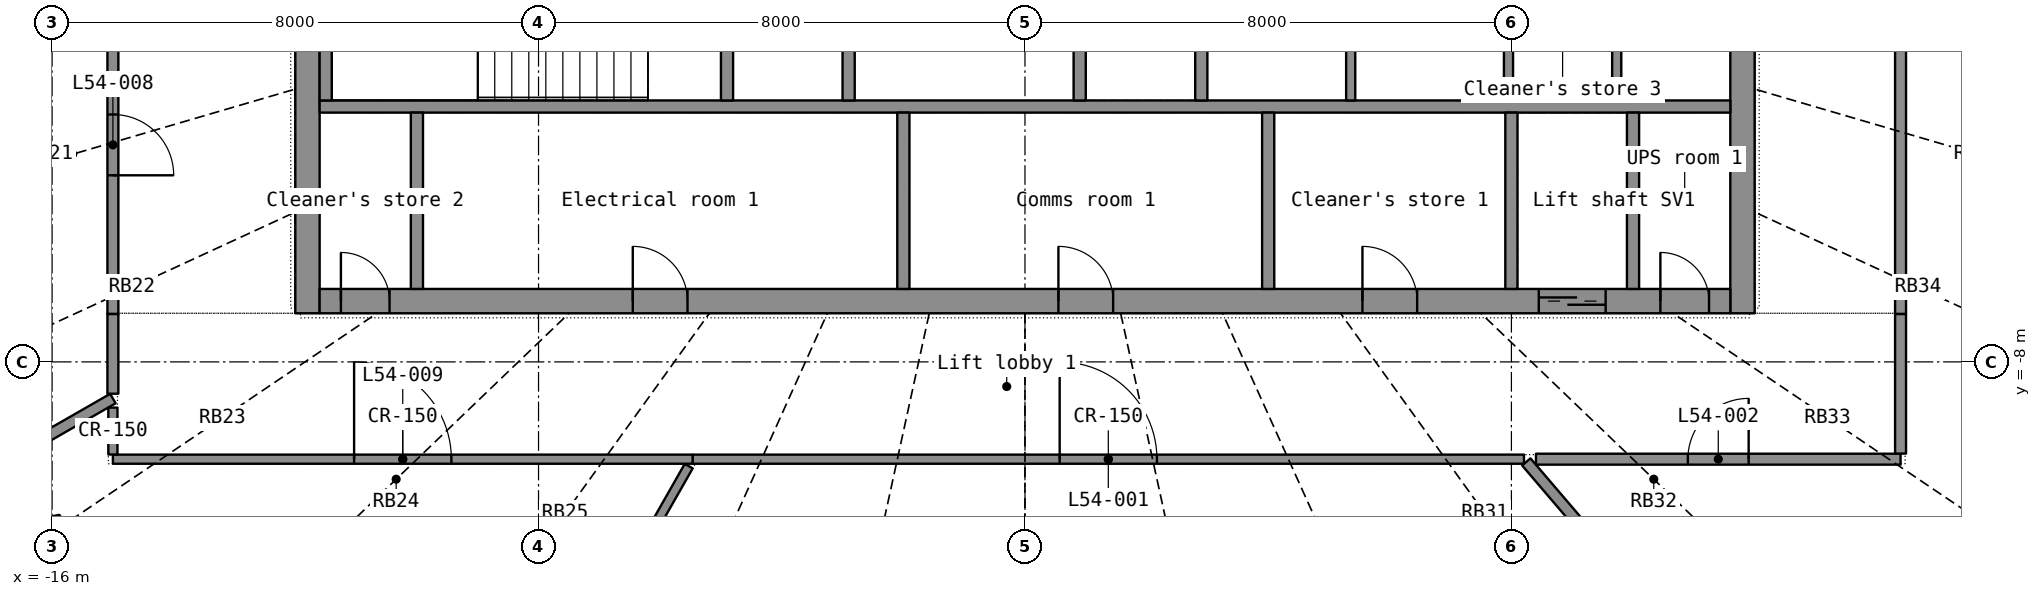
"""IFC4 building model, lengths in metres.
Left out: names, types, materials, properties, quantities, classifications, styles, units other than length and angle.
Written with IfcOpenShell. Run it as: python <this file> out.ifc"""

import sys

from ifc_helpers import new_model, si_unit, direction, frame, frame_2d, origin, origin_2d, place, context, subcontext, project, spatial, rectangle, hollow_rectangle, extrude, element, fill, save


model = new_model("IFC4")
c1 = context("Model", 3, precision=1e-05, world=origin(), true_north=direction((0.0, 1.0)))
c2 = subcontext(c1, "Body", "Model", "MODEL_VIEW")
j1 = project(units=[si_unit("LENGTHUNIT", "METRE"), si_unit("PLANEANGLEUNIT", "RADIAN")], contexts=[c1])
p1 = place(None, origin())
s1 = spatial("IfcSite", under=j1, at=p1, CompositionType="ELEMENT")
p2 = place(p1, origin())
s2 = spatial("IfcBuilding", under=s1, at=p2, CompositionType="ELEMENT")
p3 = place(p2, frame((0.0, 0.0, 224.5)))
s3 = spatial("IfcBuildingStorey", under=s2, at=p3, CompositionType="ELEMENT", Elevation=224.5)
p4 = place(p3, frame((-16.12, -10.891, 0.0), z_axis=(0.026512179, 0.018202391, 0.999482755), x_axis=(-0.720685424, 0.693231834, 0.006491821)))
e1 = element("IfcColumn", 1, at=p4, inside=s3, PredefinedType="COLUMN", context=c2, shape_type="SweptSolid", body=[
    extrude(hollow_rectangle(XDim=0.6, YDim=0.6, WallThickness=0.025, at=origin_2d()), origin(), (0.0, 0.0, 1.0), 3.702),
])
p5 = place(p3, frame((-11.8, -7.2, 0.0), z_axis=(0.0, 0.0, 1.0), x_axis=(0.0, 1.0, 0.0)))
e2 = element("IfcWall", 2, at=p5, inside=s3, PredefinedType="SHEAR", context=c2, shape_type="SweptSolid", body=[
    extrude(rectangle(XDim=14.4, YDim=0.4, at=frame_2d((7.2, 0.0))), origin(), (0.0, 0.0, 1.0), 3.3),
])
p6 = place(p5, frame((6.5, 0.0, 0.0)))
e3 = element("IfcOpeningElement", 3, at=p6, cuts=e2, PredefinedType="OPENING", context=c2, shape_type="SweptSolid", body=[
    extrude(rectangle(XDim=1.4, YDim=2.2, at=frame_2d((0.7, 1.1))), frame((0.0, 0.21, 0.0), z_axis=(0.0, -1.0, 0.0), x_axis=(1.0, 0.0, 0.0)), (0.0, 0.0, 1.0), 0.42),
])
p7 = place(p3, frame((11.8, -7.2, 0.0), z_axis=(0.0, 0.0, 1.0), x_axis=(0.0, 1.0, 0.0)))
e4 = element("IfcWall", 4, at=p7, inside=s3, PredefinedType="SHEAR", context=c2, shape_type="SweptSolid", body=[
    extrude(rectangle(XDim=14.4, YDim=0.4, at=frame_2d((7.2, 0.0))), origin(), (0.0, 0.0, 1.0), 3.3),
])
p8 = place(p7, frame((6.5, 0.0, 0.0)))
e5 = element("IfcOpeningElement", 5, at=p8, cuts=e4, PredefinedType="OPENING", context=c2, shape_type="SweptSolid", body=[
    extrude(rectangle(XDim=1.4, YDim=2.2, at=frame_2d((0.7, 1.1))), frame((0.0, 0.21, 0.0), z_axis=(0.0, -1.0, 0.0), x_axis=(1.0, 0.0, 0.0)), (0.0, 0.0, 1.0), 0.42),
])
p9 = place(p3, frame((-11.6, -7.0, 0.0), z_axis=(0.0, 0.0, 1.0), x_axis=(1.0, 0.0, 0.0)))
e6 = element("IfcWall", 6, at=p9, inside=s3, PredefinedType="SHEAR", context=c2, shape_type="SweptSolid", body=[
    extrude(rectangle(XDim=23.2, YDim=0.4, at=frame_2d((11.6, 0.0))), origin(), (0.0, 0.0, 1.0), 3.3),
])
p10 = place(p9, frame((20.05, 0.0, 0.0)))
e7 = element("IfcOpeningElement", 7, at=p10, cuts=e6, PredefinedType="OPENING", context=c2, shape_type="SweptSolid", body=[
    extrude(rectangle(XDim=1.1, YDim=2.2, at=frame_2d((0.55, 1.1))), frame((0.0, 0.21, 0.0), z_axis=(0.0, -1.0, 0.0), x_axis=(1.0, 0.0, 0.0)), (0.0, 0.0, 1.0), 0.42),
])
p11 = place(p9, frame((5.15, 0.0, 0.0)))
e8 = element("IfcOpeningElement", 8, at=p11, cuts=e6, PredefinedType="OPENING", context=c2, shape_type="SweptSolid", body=[
    extrude(rectangle(XDim=0.9, YDim=2.1, at=frame_2d((0.45, 1.05))), frame((0.0, 0.21, 0.0), z_axis=(0.0, -1.0, 0.0), x_axis=(1.0, 0.0, 0.0)), (0.0, 0.0, 1.0), 0.42),
])
p12 = place(p9, frame((12.15, 0.0, 0.0)))
e9 = element("IfcOpeningElement", 9, at=p12, cuts=e6, PredefinedType="OPENING", context=c2, shape_type="SweptSolid", body=[
    extrude(rectangle(XDim=0.9, YDim=2.1, at=frame_2d((0.45, 1.05))), frame((0.0, 0.21, 0.0), z_axis=(0.0, -1.0, 0.0), x_axis=(1.0, 0.0, 0.0)), (0.0, 0.0, 1.0), 0.42),
])
p13 = place(p9, frame((17.15, 0.0, 0.0)))
e10 = element("IfcOpeningElement", 10, at=p13, cuts=e6, PredefinedType="OPENING", context=c2, shape_type="SweptSolid", body=[
    extrude(rectangle(XDim=0.9, YDim=2.1, at=frame_2d((0.45, 1.05))), frame((0.0, 0.21, 0.0), z_axis=(0.0, -1.0, 0.0), x_axis=(1.0, 0.0, 0.0)), (0.0, 0.0, 1.0), 0.42),
])
p14 = place(p9, frame((0.35, 0.0, 0.0)))
e11 = element("IfcOpeningElement", 11, at=p14, cuts=e6, PredefinedType="OPENING", context=c2, shape_type="SweptSolid", body=[
    extrude(rectangle(XDim=0.8, YDim=2.05, at=frame_2d((0.4, 1.025))), frame((0.0, 0.21, 0.0), z_axis=(0.0, -1.0, 0.0), x_axis=(1.0, 0.0, 0.0)), (0.0, 0.0, 1.0), 0.42),
])
p15 = place(p9, frame((22.05, 0.0, 0.0)))
e12 = element("IfcOpeningElement", 12, at=p15, cuts=e6, PredefinedType="OPENING", context=c2, shape_type="SweptSolid", body=[
    extrude(rectangle(XDim=0.8, YDim=2.05, at=frame_2d((0.4, 1.025))), frame((0.0, 0.21, 0.0), z_axis=(0.0, -1.0, 0.0), x_axis=(1.0, 0.0, 0.0)), (0.0, 0.0, 1.0), 0.42),
])
p16 = place(p3, frame((-11.6, -3.8, 0.0), z_axis=(0.0, 0.0, 1.0), x_axis=(1.0, 0.0, 0.0)))
e13 = element("IfcWall", 13, at=p16, inside=s3, PredefinedType="SHEAR", context=c2, shape_type="SweptSolid", body=[
    extrude(rectangle(XDim=23.2, YDim=0.2, at=frame_2d((11.6, 0.0))), origin(), (0.0, 0.0, 1.0), 3.3),
])
for number, where, z_axis, x_axis in (
    (14, (-10.0, -6.8, 0.0), (0.0, 0.0, 1.0), (0.0, 1.0, 0.0)),
    (15, (8.0, -6.8, 0.0), (0.0, 0.0, 1.0), (0.0, 1.0, 0.0)),
    (16, (10.0, -6.8, 0.0), (0.0, 0.0, 1.0), (0.0, 1.0, 0.0)),
):
    element("IfcWall", number, at=place(p3, frame(where, z_axis=z_axis, x_axis=x_axis)), inside=s3, PredefinedType="SHEAR", context=c2, shape_type="SweptSolid", body=[
        extrude(rectangle(XDim=2.9, YDim=0.2, at=frame_2d((1.45, 0.0))), origin(), (0.0, 0.0, 1.0), 3.3),
    ])
for number, where, z_axis, x_axis in (
    (17, (-2.0, -6.8, 0.0), (0.0, 0.0, 1.0), (0.0, 1.0, 0.0)),
    (18, (4.0, -6.8, 0.0), (0.0, 0.0, 1.0), (0.0, 1.0, 0.0)),
):
    element("IfcWall", number, at=place(p3, frame(where, z_axis=z_axis, x_axis=x_axis)), inside=s3, PredefinedType="PARTITIONING", context=c2, shape_type="SweptSolid", body=[
        extrude(rectangle(XDim=2.9, YDim=0.2, at=frame_2d((1.45, 0.0))), origin(), (0.0, 0.0, 1.0), 3.3),
    ])
p17 = place(p3, frame((-2.9, -3.7, 0.0), z_axis=(0.0, 0.0, 1.0), x_axis=(0.0, 1.0, 0.0)))
e19 = element("IfcWall", 19, at=p17, inside=s3, PredefinedType="SHEAR", context=c2, shape_type="SweptSolid", body=[
    extrude(rectangle(XDim=7.4, YDim=0.2, at=frame_2d((3.7, 0.0))), origin(), (0.0, 0.0, 1.0), 3.3),
])
p18 = place(p17, frame((3.1, 0.0, 0.0)))
e20 = element("IfcOpeningElement", 20, at=p18, cuts=e19, PredefinedType="OPENING", context=c2, shape_type="SweptSolid", body=[
    extrude(rectangle(XDim=1.2, YDim=2.2, at=frame_2d((0.6, 1.1))), frame((0.0, 0.11, 0.0), z_axis=(0.0, -1.0, 0.0), x_axis=(1.0, 0.0, 0.0)), (0.0, 0.0, 1.0), 0.22),
])
p19 = place(p3, frame((2.9, -3.7, 0.0), z_axis=(0.0, 0.0, 1.0), x_axis=(0.0, 1.0, 0.0)))
e21 = element("IfcWall", 21, at=p19, inside=s3, PredefinedType="SHEAR", context=c2, shape_type="SweptSolid", body=[
    extrude(rectangle(XDim=7.4, YDim=0.2, at=frame_2d((3.7, 0.0))), origin(), (0.0, 0.0, 1.0), 3.3),
])
p20 = place(p19, frame((3.1, 0.0, 0.0)))
e22 = element("IfcOpeningElement", 22, at=p20, cuts=e21, PredefinedType="OPENING", context=c2, shape_type="SweptSolid", body=[
    extrude(rectangle(XDim=1.2, YDim=2.2, at=frame_2d((0.6, 1.1))), frame((0.0, 0.11, 0.0), z_axis=(0.0, -1.0, 0.0), x_axis=(1.0, 0.0, 0.0)), (0.0, 0.0, 1.0), 0.22),
])
for number, where, z_axis, x_axis in (
    (23, (0.9, -3.7, 0.0), (0.0, 0.0, 1.0), (0.0, 1.0, 0.0)),
    (24, (-11.5, -3.7, 0.0), (0.0, 0.0, 1.0), (0.0, 1.0, 0.0)),
    (25, (-4.9, -3.7, 0.0), (0.0, 0.0, 1.0), (0.0, 1.0, 0.0)),
):
    element("IfcWall", number, at=place(p3, frame(where, z_axis=z_axis, x_axis=x_axis)), inside=s3, PredefinedType="SHEAR", context=c2, shape_type="SweptSolid", body=[
        extrude(rectangle(XDim=2.35, YDim=0.2, at=frame_2d((1.175, 0.0))), origin(), (0.0, 0.0, 1.0), 3.3),
    ])
for number, where, z_axis, x_axis in (
    (26, (5.357, -3.7, 0.0), (0.0, 0.0, 1.0), (0.0, 1.0, 0.0)),
    (27, (7.952, -3.7, 0.0), (0.0, 0.0, 1.0), (0.0, 1.0, 0.0)),
    (28, (9.732, -3.7, 0.0), (0.0, 0.0, 1.0), (0.0, 1.0, 0.0)),
):
    element("IfcWall", number, at=place(p3, frame(where, z_axis=z_axis, x_axis=x_axis)), inside=s3, PredefinedType="PARTITIONING", context=c2, shape_type="SweptSolid", body=[
        extrude(rectangle(XDim=2.35, YDim=0.15, at=frame_2d((1.175, 0.0))), origin(), (0.0, 0.0, 1.0), 3.3),
    ])
p21 = place(p3, frame((-5.465, -9.6, 0.0), z_axis=(0.0, 0.0, 1.0), x_axis=(1.0, 0.0, 0.0)))
e29 = element("IfcWall", 29, at=p21, inside=s3, PredefinedType="PARTITIONING", context=c2, shape_type="SweptSolid", body=[
    extrude(rectangle(XDim=13.671, YDim=0.15, at=frame_2d((6.836, 0.0))), origin(), (0.0, 0.0, 1.0), 2.4),
])
p22 = place(p21, frame((6.036, 0.0, 0.0)))
e30 = element("IfcOpeningElement", 30, at=p22, cuts=e29, PredefinedType="OPENING", context=c2, shape_type="SweptSolid", body=[
    extrude(rectangle(XDim=1.6, YDim=2.4, at=frame_2d((0.8, 1.2))), frame((0.0, 0.085, 0.0), z_axis=(0.0, -1.0, 0.0), x_axis=(1.0, 0.0, 0.0)), (0.0, 0.0, 1.0), 0.17),
])
p23 = place(p3, frame((-15.0, -9.6, 0.0), z_axis=(0.0, 0.0, 1.0), x_axis=(1.0, 0.0, 0.0)))
e31 = element("IfcWall", 31, at=p23, inside=s3, PredefinedType="PARTITIONING", context=c2, shape_type="SweptSolid", body=[
    extrude(rectangle(XDim=9.534, YDim=0.15, at=frame_2d((4.767, 0.0))), origin(), (0.0, 0.0, 1.0), 2.4),
])
p24 = place(p23, frame((3.967, 0.0, 0.0)))
e32 = element("IfcOpeningElement", 32, at=p24, cuts=e31, PredefinedType="OPENING", context=c2, shape_type="SweptSolid", body=[
    extrude(rectangle(XDim=1.6, YDim=2.4, at=frame_2d((0.8, 1.2))), frame((0.0, 0.085, 0.0), z_axis=(0.0, -1.0, 0.0), x_axis=(1.0, 0.0, 0.0)), (0.0, 0.0, 1.0), 0.17),
])
p25 = place(p3, frame((-5.53, -9.714, 0.0), z_axis=(0.0, 0.0, 1.0), x_axis=(-0.494743906, -0.869038818, 0.0)))
e33 = element("IfcWall", 33, at=p25, inside=s3, PredefinedType="PARTITIONING", context=c2, shape_type="SweptSolid", body=[
    extrude(rectangle(XDim=7.354, YDim=0.15, at=frame_2d((3.677, 0.0))), origin(), (0.0, 0.0, 1.0), 2.4),
])
p26 = place(p3, frame((12.446, -14.56, 0.0), z_axis=(0.0, 0.0, 1.0), x_axis=(-0.649761442, 0.76013819, 0.0)))
e34 = element("IfcWall", 34, at=p26, inside=s3, PredefinedType="PARTITIONING", context=c2, shape_type="SweptSolid", body=[
    extrude(rectangle(XDim=6.465, YDim=0.18, at=frame_2d((3.233, 0.0))), origin(), (0.0, 0.0, 1.0), 2.4),
])
p27 = place(p3, frame((8.404, -9.6, 0.0), z_axis=(0.0, 0.0, 1.0), x_axis=(1.0, 0.0, 0.0)))
e35 = element("IfcWall", 35, at=p27, inside=s3, PredefinedType="PARTITIONING", context=c2, shape_type="SweptSolid", body=[
    extrude(rectangle(XDim=5.996, YDim=0.18, at=frame_2d((2.998, 0.0))), origin(), (0.0, 0.0, 1.0), 2.4),
])
p28 = place(p27, frame((2.498, 0.0, 0.0)))
e36 = element("IfcOpeningElement", 36, at=p28, cuts=e35, PredefinedType="OPENING", context=c2, shape_type="SweptSolid", body=[
    extrude(rectangle(XDim=1.0, YDim=2.1, at=frame_2d((0.5, 1.05))), frame((0.0, 0.1, 0.0), z_axis=(0.0, -1.0, 0.0), x_axis=(1.0, 0.0, 0.0)), (0.0, 0.0, 1.0), 0.2),
])
p29 = place(p3, frame((-15.0, -1.65, 0.0), z_axis=(0.0, 0.0, 1.0), x_axis=(0.0, -1.0, 0.0)))
e37 = element("IfcWall", 37, at=p29, inside=s3, PredefinedType="PARTITIONING", context=c2, shape_type="SweptSolid", body=[
    extrude(rectangle(XDim=5.562, YDim=0.18, at=frame_2d((2.781, 0.0))), origin(), (0.0, 0.0, 1.0), 2.4),
])
p30 = place(p29, frame((2.281, 0.0, 0.0)))
e38 = element("IfcOpeningElement", 38, at=p30, cuts=e37, PredefinedType="OPENING", context=c2, shape_type="SweptSolid", body=[
    extrude(rectangle(XDim=1.0, YDim=2.1, at=frame_2d((0.5, 1.05))), frame((0.0, 0.1, 0.0), z_axis=(0.0, -1.0, 0.0), x_axis=(1.0, 0.0, 0.0)), (0.0, 0.0, 1.0), 0.2),
])
p31 = place(p3, frame((14.4, -7.212, 0.0), z_axis=(0.0, 0.0, 1.0), x_axis=(0.0, 1.0, 0.0)))
e39 = element("IfcWall", 39, at=p31, inside=s3, PredefinedType="PARTITIONING", context=c2, shape_type="SweptSolid", body=[
    extrude(rectangle(XDim=5.562, YDim=0.18, at=frame_2d((2.781, 0.0))), origin(), (0.0, 0.0, 1.0), 2.4),
])
p32 = place(p3, frame((-17.78, -10.198, 0.0), z_axis=(0.0, 0.0, 1.0), x_axis=(0.867435755, 0.497549205, 0.0)))
e40 = element("IfcWall", 40, at=p32, inside=s3, PredefinedType="PARTITIONING", context=c2, shape_type="SweptSolid", body=[
    extrude(rectangle(XDim=3.205, YDim=0.18, at=frame_2d((1.603, 0.0))), origin(), (0.0, 0.0, 1.0), 2.4),
])
p33 = place(p3, frame((14.4, -9.508, 0.0), z_axis=(0.0, 0.0, 1.0), x_axis=(0.0, 1.0, 0.0)))
e41 = element("IfcWall", 41, at=p33, inside=s3, PredefinedType="PARTITIONING", context=c2, shape_type="SweptSolid", body=[
    extrude(rectangle(XDim=2.295, YDim=0.18, at=frame_2d((1.147, 0.0))), origin(), (0.0, 0.0, 1.0), 2.4),
])
p34 = place(p3, frame((-15.0, -7.213, 0.0), z_axis=(0.0, 0.0, 1.0), x_axis=(0.0, -1.0, 0.0)))
e42 = element("IfcWall", 42, at=p34, inside=s3, PredefinedType="PARTITIONING", context=c2, shape_type="SweptSolid", body=[
    extrude(rectangle(XDim=1.31, YDim=0.18, at=frame_2d((0.655, 0.0))), origin(), (0.0, 0.0, 1.0), 2.4),
])
p35 = place(p3, frame((-15.0, -8.752, 0.0), z_axis=(0.0, 0.0, 1.0), x_axis=(0.0, -1.0, 0.0)))
e43 = element("IfcWall", 43, at=p35, inside=s3, PredefinedType="PARTITIONING", context=c2, shape_type="SweptSolid", body=[
    extrude(rectangle(XDim=0.771, YDim=0.15, at=frame_2d((0.385, 0.0))), origin(), (0.0, 0.0, 1.0), 2.4),
])
p36 = place(p10, origin())
e44 = element("IfcDoor", 44, at=p36, inside=s3, OperationType="DOUBLE_DOOR_SLIDING", PredefinedType="DOOR", context=c2, shape_type="SweptSolid", body=[
    extrude(rectangle(XDim=1.1, YDim=2.2, at=frame_2d((0.55, 1.1))), frame((0.0, 0.025, 0.0), z_axis=(0.0, -1.0, 0.0), x_axis=(1.0, 0.0, 0.0)), (0.0, 0.0, 1.0), 0.05),
])
fill(e7, e44)
p37 = place(p11, origin())
e45 = element("IfcDoor", 45, at=p37, inside=s3, OperationType="SINGLE_SWING_LEFT", PredefinedType="DOOR", context=c2, shape_type="SweptSolid", body=[
    extrude(rectangle(XDim=0.9, YDim=2.1, at=frame_2d((0.45, 1.05))), frame((0.0, 0.025, 0.0), z_axis=(0.0, -1.0, 0.0), x_axis=(1.0, 0.0, 0.0)), (0.0, 0.0, 1.0), 0.05),
])
fill(e8, e45)
p38 = place(p12, origin())
e46 = element("IfcDoor", 46, at=p38, inside=s3, OperationType="SINGLE_SWING_LEFT", PredefinedType="DOOR", context=c2, shape_type="SweptSolid", body=[
    extrude(rectangle(XDim=0.9, YDim=2.1, at=frame_2d((0.45, 1.05))), frame((0.0, 0.025, 0.0), z_axis=(0.0, -1.0, 0.0), x_axis=(1.0, 0.0, 0.0)), (0.0, 0.0, 1.0), 0.05),
])
fill(e9, e46)
p39 = place(p13, origin())
e47 = element("IfcDoor", 47, at=p39, inside=s3, OperationType="SINGLE_SWING_LEFT", PredefinedType="DOOR", context=c2, shape_type="SweptSolid", body=[
    extrude(rectangle(XDim=0.9, YDim=2.1, at=frame_2d((0.45, 1.05))), frame((0.0, 0.025, 0.0), z_axis=(0.0, -1.0, 0.0), x_axis=(1.0, 0.0, 0.0)), (0.0, 0.0, 1.0), 0.05),
])
fill(e10, e47)
p40 = place(p14, origin())
e48 = element("IfcDoor", 48, at=p40, inside=s3, OperationType="SINGLE_SWING_LEFT", PredefinedType="DOOR", context=c2, shape_type="SweptSolid", body=[
    extrude(rectangle(XDim=0.8, YDim=2.05, at=frame_2d((0.4, 1.025))), frame((0.0, 0.025, 0.0), z_axis=(0.0, -1.0, 0.0), x_axis=(1.0, 0.0, 0.0)), (0.0, 0.0, 1.0), 0.05),
])
fill(e11, e48)
p41 = place(p15, origin())
e49 = element("IfcDoor", 49, at=p41, inside=s3, OperationType="SINGLE_SWING_LEFT", PredefinedType="DOOR", context=c2, shape_type="SweptSolid", body=[
    extrude(rectangle(XDim=0.8, YDim=2.05, at=frame_2d((0.4, 1.025))), frame((0.0, 0.025, 0.0), z_axis=(0.0, -1.0, 0.0), x_axis=(1.0, 0.0, 0.0)), (0.0, 0.0, 1.0), 0.05),
])
fill(e12, e49)
p42 = place(p22, origin())
e50 = element("IfcDoor", 50, at=p42, inside=s3, OperationType="DOUBLE_DOOR_SINGLE_SWING", PredefinedType="DOOR", context=c2, shape_type="SweptSolid", body=[
    extrude(rectangle(XDim=1.6, YDim=2.4, at=frame_2d((0.8, 1.2))), frame((0.0, 0.025, 0.0), z_axis=(0.0, -1.0, 0.0), x_axis=(1.0, 0.0, 0.0)), (0.0, 0.0, 1.0), 0.05),
])
fill(e30, e50)
p43 = place(p28, origin())
e51 = element("IfcDoor", 51, at=p43, inside=s3, OperationType="SINGLE_SWING_RIGHT", PredefinedType="DOOR", context=c2, shape_type="SweptSolid", body=[
    extrude(rectangle(XDim=1.0, YDim=2.1, at=frame_2d((0.5, 1.05))), frame((0.0, 0.025, 0.0), z_axis=(0.0, -1.0, 0.0), x_axis=(1.0, 0.0, 0.0)), (0.0, 0.0, 1.0), 0.05),
])
fill(e36, e51)
p44 = place(p30, origin())
e52 = element("IfcDoor", 52, at=p44, inside=s3, OperationType="SINGLE_SWING_RIGHT", PredefinedType="DOOR", context=c2, shape_type="SweptSolid", body=[
    extrude(rectangle(XDim=1.0, YDim=2.1, at=frame_2d((0.5, 1.05))), frame((0.0, 0.025, 0.0), z_axis=(0.0, -1.0, 0.0), x_axis=(1.0, 0.0, 0.0)), (0.0, 0.0, 1.0), 0.05),
])
fill(e38, e52)
p45 = place(p24, origin())
e53 = element("IfcDoor", 53, at=p45, inside=s3, OperationType="DOUBLE_DOOR_SINGLE_SWING", PredefinedType="DOOR", context=c2, shape_type="SweptSolid", body=[
    extrude(rectangle(XDim=1.6, YDim=2.4, at=frame_2d((0.8, 1.2))), frame((0.0, 0.025, 0.0), z_axis=(0.0, -1.0, 0.0), x_axis=(1.0, 0.0, 0.0)), (0.0, 0.0, 1.0), 0.05),
])
fill(e32, e53)
save(model, sys.argv[1])
